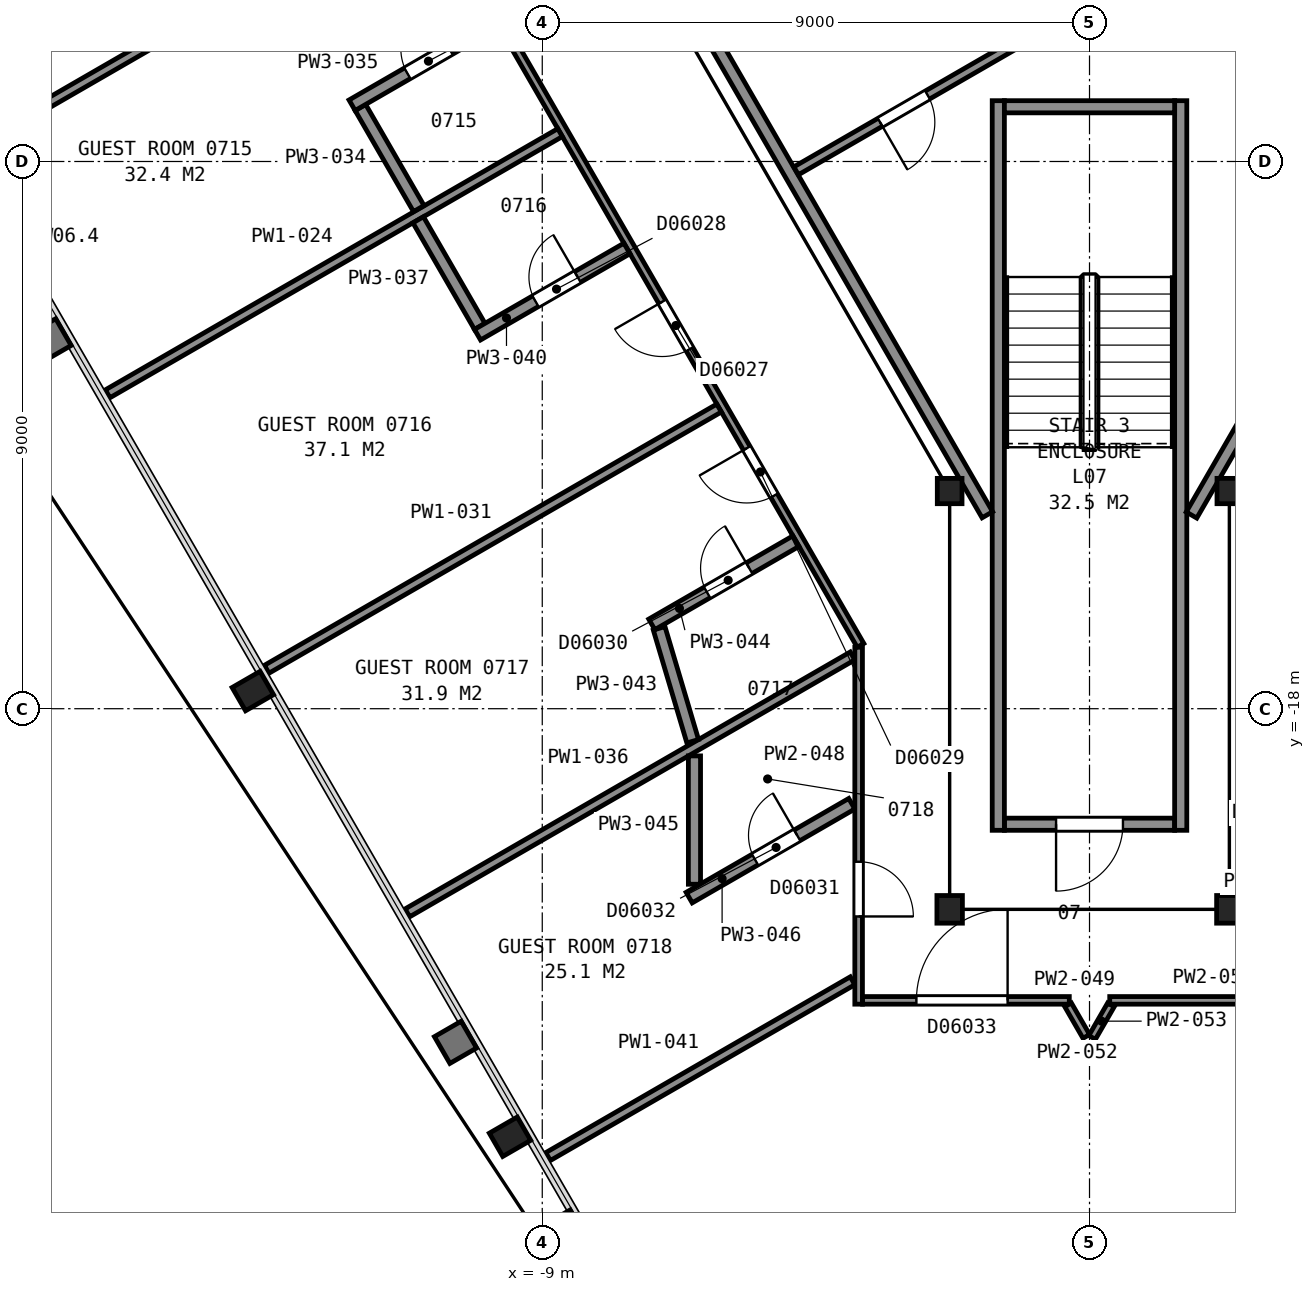
"""IFC4 building model, lengths in metres.
Left out: names, types, materials, properties, quantities, classifications, styles, units other than length and angle.
Written with IfcOpenShell. Run it as: python <this file> out.ifc"""

import sys

from ifc_helpers import new_model, si_unit, direction, frame, frame_2d, origin, origin_2d, place, context, subcontext, project, spatial, rectangle, i_section, extrude, element, fill, save


model = new_model("IFC4")
c1 = context("Model", 3, precision=1e-05, world=origin(), true_north=direction((0.0, 1.0)))
c2 = subcontext(c1, "Body", "Model", "MODEL_VIEW")
j1 = project(units=[si_unit("LENGTHUNIT", "METRE"), si_unit("PLANEANGLEUNIT", "RADIAN")], contexts=[c1])
p1 = place(None, origin())
s1 = spatial("IfcSite", under=j1, at=p1, CompositionType="ELEMENT")
p2 = place(p1, origin())
s2 = spatial("IfcBuilding", under=s1, at=p2, CompositionType="ELEMENT")
p3 = place(p2, frame((0.0, 0.0, 40.4)))
s3 = spatial("IfcBuildingStorey", under=s2, at=p3, CompositionType="ELEMENT", Elevation=40.4)
for number, where, z_axis, x_axis in (
    (1, (-13.76, -17.71, 0.0), (0.0, 0.0, 1.0), (-0.5, 0.866, 0.0)),
    (2, (-9.53, -25.04, 0.0), (0.0, 0.0, 1.0), (-0.5, 0.866, 0.0)),
):
    element("IfcColumn", number, at=place(p3, frame(where, z_axis=z_axis, x_axis=x_axis)), inside=s3, PredefinedType="COLUMN", context=c2, shape_type="SweptSolid", body=[
        extrude(i_section(OverallWidth=0.442, OverallDepth=0.531, WebThickness=0.066, FlangeThickness=0.106, FilletRadius=0.015, at=origin_2d()), origin(), (0.0, 0.0, 1.0), 3.575),
    ])
p4 = place(p3, frame((-2.3, -14.42, 0.0), z_axis=(0.0, 0.0, 1.0), x_axis=(1.0, 0.0, 0.0)))
e3 = element("IfcColumn", 3, at=p4, inside=s3, PredefinedType="COLUMN", context=c2, shape_type="SweptSolid", body=[
    extrude(i_section(OverallWidth=0.406, OverallDepth=0.417, WebThickness=0.03, FlangeThickness=0.048, FilletRadius=0.015, at=origin_2d()), origin(), (0.0, 0.0, 1.0), 3.6),
])
for number, where, z_axis, x_axis in (
    (4, (-2.3, -21.3, 0.0), (0.0, 0.0, 1.0), (-1.0, 0.0, 0.0)),
    (5, (2.3, -21.3, 0.0), (0.0, 0.0, 1.0), (-1.0, 0.0, 0.0)),
):
    element("IfcColumn", number, at=place(p3, frame(where, z_axis=z_axis, x_axis=x_axis)), inside=s3, PredefinedType="COLUMN", context=c2, shape_type="SweptSolid", body=[
        extrude(i_section(OverallWidth=0.419, OverallDepth=0.455, WebThickness=0.042, FlangeThickness=0.068, FilletRadius=0.015, at=origin_2d()), origin(), (0.0, 0.0, 1.0), 3.6),
    ])
p5 = place(p3, frame((2.3, -14.42, 0.0), z_axis=(0.0, 0.0, 1.0), x_axis=(1.0, 0.0, 0.0)))
e6 = element("IfcColumn", 6, at=p5, inside=s3, PredefinedType="COLUMN", context=c2, shape_type="SweptSolid", body=[
    extrude(i_section(OverallWidth=0.406, OverallDepth=0.417, WebThickness=0.03, FlangeThickness=0.048, FilletRadius=0.015, at=origin_2d()), origin(), (0.0, 0.0, 1.0), 3.6),
])
p6 = place(p3, frame((-1.4, -19.9, 0.0), z_axis=(0.0, 0.0, 1.0), x_axis=(1.0, 0.0, 0.0)))
e7 = element("IfcWall", 7, at=p6, inside=s3, PredefinedType="PARTITIONING", context=c2, shape_type="SweptSolid", body=[
    extrude(rectangle(XDim=2.8, YDim=0.2, at=frame_2d((1.4, 0.0))), origin(), (0.0, 0.0, 1.0), 3.35),
])
p7 = place(p6, frame((0.85, 0.0, 0.0)))
e8 = element("IfcOpeningElement", 8, at=p7, cuts=e7, PredefinedType="OPENING", context=c2, shape_type="SweptSolid", body=[
    extrude(rectangle(XDim=1.1, YDim=2.1, at=frame_2d((0.55, 1.05))), frame((0.0, 0.11, 0.0), z_axis=(0.0, -1.0, 0.0), x_axis=(1.0, 0.0, 0.0)), (0.0, 0.0, 1.0), 0.22),
])
for number, where, z_axis, x_axis in (
    (9, (1.5, -8.0, 0.0), (0.0, 0.0, 1.0), (0.0, -1.0, 0.0)),
    (10, (-1.5, -8.0, 0.0), (0.0, 0.0, 1.0), (0.0, -1.0, 0.0)),
):
    element("IfcWall", number, at=place(p3, frame(where, z_axis=z_axis, x_axis=x_axis)), inside=s3, PredefinedType="PARTITIONING", context=c2, shape_type="SweptSolid", body=[
        extrude(rectangle(XDim=12.0, YDim=0.2, at=frame_2d((6.0, 0.0))), origin(), (0.0, 0.0, 1.0), 3.35),
    ])
p8 = place(p3, frame((-1.4, -8.1, 0.0), z_axis=(0.0, 0.0, 1.0), x_axis=(1.0, 0.0, 0.0)))
e11 = element("IfcWall", 11, at=p8, inside=s3, PredefinedType="PARTITIONING", context=c2, shape_type="SweptSolid", body=[
    extrude(rectangle(XDim=2.8, YDim=0.2, at=frame_2d((1.4, 0.0))), origin(), (0.0, 0.0, 1.0), 3.35),
])
p9 = place(p3, frame((-13.664, 5.946, 0.0), z_axis=(0.0, 0.0, 1.0), x_axis=(0.499994327219, -0.866028678941, 0.0)))
e12 = element("IfcWall", 12, at=p9, inside=s3, PredefinedType="PARTITIONING", context=c2, shape_type="SweptSolid", body=[
    extrude(rectangle(XDim=23.968, YDim=0.2, at=frame_2d((11.984, 0.0))), origin(), (0.0, 0.0, 1.0), 3.35),
])
p10 = place(p3, frame((-4.825, -9.154, 0.0), z_axis=(0.0, 0.0, 1.0), x_axis=(0.866023738697, 0.500002884005, 0.0)))
e13 = element("IfcWall", 13, at=p10, inside=s3, PredefinedType="PARTITIONING", context=c2, shape_type="SweptSolid", body=[
    extrude(rectangle(XDim=4.22, YDim=0.15, at=frame_2d((2.11, 0.0))), origin(), (0.0, 0.0, 1.0), 3.35),
])
p11 = place(p10, frame((1.595, 0.0, 0.0)))
e14 = element("IfcOpeningElement", 14, at=p11, cuts=e13, PredefinedType="OPENING", context=c2, shape_type="SweptSolid", body=[
    extrude(rectangle(XDim=0.9, YDim=2.1, at=frame_2d((0.45, 1.05))), frame((0.0, 0.085, 0.0), z_axis=(0.0, -1.0, 0.0), x_axis=(1.0, 0.0, 0.0)), (0.0, 0.0, 1.0), 0.17),
])
p12 = place(p3, frame((1.677, -14.815, 0.0), z_axis=(0.0, 0.0, 1.0), x_axis=(0.49999445743, 0.866028603765, 0.0)))
e15 = element("IfcWall", 15, at=p12, inside=s3, PredefinedType="PARTITIONING", context=c2, shape_type="SweptSolid", body=[
    extrude(rectangle(XDim=5.905, YDim=0.2, at=frame_2d((2.952, 0.0))), origin(), (0.0, 0.0, 1.0), 3.35),
])
p13 = place(p12, frame((3.855, 0.0, 0.0)))
e16 = element("IfcOpeningElement", 16, at=p13, cuts=e15, PredefinedType="OPENING", context=c2, shape_type="SweptSolid", body=[
    extrude(rectangle(XDim=1.8, YDim=2.1, at=frame_2d((0.9, 1.05))), frame((0.0, 0.11, 0.0), z_axis=(0.0, -1.0, 0.0), x_axis=(1.0, 0.0, 0.0)), (0.0, 0.0, 1.0), 0.22),
])
p14 = place(p3, frame((-18.462, -8.813, 0.0), z_axis=(0.0, 0.0, 1.0), x_axis=(0.866029425019, 0.499993034952, 0.0)))
e17 = element("IfcWall", 17, at=p14, inside=s3, PredefinedType="PARTITIONING", context=c2, shape_type="SweptSolid", body=[
    extrude(rectangle(XDim=8.591, YDim=0.15, at=frame_2d((4.296, 0.0))), origin(), (0.0, 0.0, 1.0), 2.613),
])
p15 = place(p3, frame((-3.766, -16.958, 0.0), z_axis=(0.0, 0.0, 1.0), x_axis=(-0.500024758804, 0.866011108811, 0.0)))
e18 = element("IfcWall", 18, at=p15, inside=s3, PredefinedType="PARTITIONING", context=c2, shape_type="SweptSolid", body=[
    extrude(rectangle(XDim=26.402, YDim=0.125, at=frame_2d((13.201, 0.0))), origin(), (0.0, 0.0, 1.0), 2.613),
])
p16 = place(p15, frame((25.139, 0.0, 0.0)))
e19 = element("IfcOpeningElement", 19, at=p16, cuts=e18, PredefinedType="OPENING", context=c2, shape_type="SweptSolid", body=[
    extrude(rectangle(XDim=0.9, YDim=2.1, at=frame_2d((0.45, 1.05))), frame((0.0, 0.073, 0.0), z_axis=(0.0, -1.0, 0.0), x_axis=(1.0, 0.0, 0.0)), (0.0, 0.0, 1.0), 0.145),
])
p17 = place(p15, frame((22.963, 0.0, 0.0)))
e20 = element("IfcOpeningElement", 20, at=p17, cuts=e18, PredefinedType="OPENING", context=c2, shape_type="SweptSolid", body=[
    extrude(rectangle(XDim=1.0, YDim=2.1, at=frame_2d((0.5, 1.05))), frame((0.0, 0.073, 0.0), z_axis=(0.0, -1.0, 0.0), x_axis=(1.0, 0.0, 0.0)), (0.0, 0.0, 1.0), 0.145),
])
p18 = place(p15, frame((15.228, 0.0, 0.0)))
e21 = element("IfcOpeningElement", 21, at=p18, cuts=e18, PredefinedType="OPENING", context=c2, shape_type="SweptSolid", body=[
    extrude(rectangle(XDim=0.9, YDim=2.1, at=frame_2d((0.45, 1.05))), frame((0.0, 0.073, 0.0), z_axis=(0.0, -1.0, 0.0), x_axis=(1.0, 0.0, 0.0)), (0.0, 0.0, 1.0), 0.145),
])
p19 = place(p15, frame((12.702, 0.0, 0.0)))
e22 = element("IfcOpeningElement", 22, at=p19, cuts=e18, PredefinedType="OPENING", context=c2, shape_type="SweptSolid", body=[
    extrude(rectangle(XDim=0.9, YDim=2.1, at=frame_2d((0.45, 1.05))), frame((0.0, 0.073, 0.0), z_axis=(0.0, -1.0, 0.0), x_axis=(1.0, 0.0, 0.0)), (0.0, 0.0, 1.0), 0.145),
])
p20 = place(p15, frame((5.624, 0.0, 0.0)))
e23 = element("IfcOpeningElement", 23, at=p20, cuts=e18, PredefinedType="OPENING", context=c2, shape_type="SweptSolid", body=[
    extrude(rectangle(XDim=0.9, YDim=2.1, at=frame_2d((0.45, 1.05))), frame((0.0, 0.073, 0.0), z_axis=(0.0, -1.0, 0.0), x_axis=(1.0, 0.0, 0.0)), (0.0, 0.0, 1.0), 0.145),
])
p21 = place(p15, frame((2.843, 0.0, 0.0)))
e24 = element("IfcOpeningElement", 24, at=p21, cuts=e18, PredefinedType="OPENING", context=c2, shape_type="SweptSolid", body=[
    extrude(rectangle(XDim=0.9, YDim=2.1, at=frame_2d((0.45, 1.05))), frame((0.0, 0.073, 0.0), z_axis=(0.0, -1.0, 0.0), x_axis=(1.0, 0.0, 0.0)), (0.0, 0.0, 1.0), 0.145),
])
p22 = place(p3, frame((-16.148, -12.821, 0.0), z_axis=(0.0, 0.0, 1.0), x_axis=(0.866036528751, 0.499980730498, 0.0)))
e25 = element("IfcWall", 25, at=p22, inside=s3, PredefinedType="PARTITIONING", context=c2, shape_type="SweptSolid", body=[
    extrude(rectangle(XDim=8.592, YDim=0.15, at=frame_2d((4.296, 0.0))), origin(), (0.0, 0.0, 1.0), 2.613),
])
p23 = place(p3, frame((-13.532, -17.351, 0.0), z_axis=(0.0, 0.0, 1.0), x_axis=(0.866002910178, 0.500038958046, 0.0)))
e26 = element("IfcWall", 26, at=p23, inside=s3, PredefinedType="PARTITIONING", context=c2, shape_type="SweptSolid", body=[
    extrude(rectangle(XDim=8.591, YDim=0.15, at=frame_2d((4.295, 0.0))), origin(), (0.0, 0.0, 1.0), 2.613),
])
p24 = place(p3, frame((-11.991, -8.112, 0.0), z_axis=(0.0, 0.0, 1.0), x_axis=(0.499913221443, -0.866075499611, 0.0)))
e27 = element("IfcWall", 27, at=p24, inside=s3, PredefinedType="PARTITIONING", context=c2, shape_type="SweptSolid", body=[
    extrude(rectangle(XDim=1.92, YDim=0.2, at=frame_2d((0.96, 0.0))), origin(), (0.0, 0.0, 1.0), 2.613),
])
p25 = place(p3, frame((-9.761, -6.709, 0.0), z_axis=(0.0, 0.0, 1.0), x_axis=(-0.866012976267, -0.500021524473, 0.0)))
e28 = element("IfcWall", 28, at=p25, inside=s3, PredefinedType="PARTITIONING", context=c2, shape_type="SweptSolid", body=[
    extrude(rectangle(XDim=2.732, YDim=0.2, at=frame_2d((1.366, 0.0))), origin(), (0.0, 0.0, 1.0), 2.613),
])
p26 = place(p25, frame((0.882, 0.0, 0.0)))
e29 = element("IfcOpeningElement", 29, at=p26, cuts=e28, PredefinedType="OPENING", context=c2, shape_type="SweptSolid", body=[
    extrude(rectangle(XDim=0.8, YDim=2.1, at=frame_2d((0.4, 1.05))), frame((0.0, 0.11, 0.0), z_axis=(0.0, -1.0, 0.0), x_axis=(1.0, 0.0, 0.0)), (0.0, 0.0, 1.0), 0.22),
])
p27 = place(p3, frame((-11.219, -21.358, 0.0), z_axis=(0.0, 0.0, 1.0), x_axis=(0.866084603656, 0.499897448793, 0.0)))
e30 = element("IfcWall", 30, at=p27, inside=s3, PredefinedType="PARTITIONING", context=c2, shape_type="SweptSolid", body=[
    extrude(rectangle(XDim=8.454, YDim=0.15, at=frame_2d((4.227, 0.0))), origin(), (0.0, 0.0, 1.0), 2.613),
])
p28 = place(p3, frame((-11.041, -9.959, 0.0), z_axis=(0.0, 0.0, 1.0), x_axis=(0.500042536776, -0.866000843773, 0.0)))
e31 = element("IfcWall", 31, at=p28, inside=s3, PredefinedType="PARTITIONING", context=c2, shape_type="SweptSolid", body=[
    extrude(rectangle(XDim=2.025, YDim=0.2, at=frame_2d((1.012, 0.0))), origin(), (0.0, 0.0, 1.0), 2.613),
])
p29 = place(p3, frame((-10.065, -11.849, 0.0), z_axis=(0.0, 0.0, 1.0), x_axis=(0.866048046904, 0.499960778915, 0.0)))
e32 = element("IfcWall", 32, at=p29, inside=s3, PredefinedType="PARTITIONING", context=c2, shape_type="SweptSolid", body=[
    extrude(rectangle(XDim=2.838, YDim=0.2, at=frame_2d((1.419, 0.0))), origin(), (0.0, 0.0, 1.0), 2.613),
])
p30 = place(p29, frame((1.1, 0.0, 0.0)))
e33 = element("IfcOpeningElement", 33, at=p30, cuts=e32, PredefinedType="OPENING", context=c2, shape_type="SweptSolid", body=[
    extrude(rectangle(XDim=0.8, YDim=2.1, at=frame_2d((0.4, 1.05))), frame((0.0, 0.11, 0.0), z_axis=(0.0, -1.0, 0.0), x_axis=(1.0, 0.0, 0.0)), (0.0, 0.0, 1.0), 0.22),
])
p31 = place(p3, frame((-8.905, -25.366, 0.0), z_axis=(0.0, 0.0, 1.0), x_axis=(0.866025977343, 0.499999006567, 0.0)))
e34 = element("IfcWall", 34, at=p31, inside=s3, PredefinedType="PARTITIONING", context=c2, shape_type="SweptSolid", body=[
    extrude(rectangle(XDim=5.782, YDim=0.15, at=frame_2d((2.891, 0.0))), origin(), (0.0, 0.0, 1.0), 2.613),
])
p32 = place(p3, frame((-7.078, -16.678, 0.0), z_axis=(0.0, 0.0, 1.0), x_axis=(0.284907685531, -0.958554959679, 0.0)))
e35 = element("IfcWall", 35, at=p32, inside=s3, PredefinedType="PARTITIONING", context=c2, shape_type="SweptSolid", body=[
    extrude(rectangle(XDim=1.938, YDim=0.2, at=frame_2d((0.969, 0.0))), origin(), (0.0, 0.0, 1.0), 2.613),
])
p33 = place(p3, frame((-4.828, -15.244, 0.0), z_axis=(0.0, 0.0, 1.0), x_axis=(-0.86596722502, -0.50010075504, 0.0)))
e36 = element("IfcWall", 36, at=p33, inside=s3, PredefinedType="PARTITIONING", context=c2, shape_type="SweptSolid", body=[
    extrude(rectangle(XDim=2.737, YDim=0.2, at=frame_2d((1.369, 0.0))), origin(), (0.0, 0.0, 1.0), 2.613),
])
p34 = place(p33, frame((0.887, 0.0, 0.0)))
e37 = element("IfcOpeningElement", 37, at=p34, cuts=e36, PredefinedType="OPENING", context=c2, shape_type="SweptSolid", body=[
    extrude(rectangle(XDim=0.8, YDim=2.1, at=frame_2d((0.4, 1.05))), frame((0.0, 0.11, 0.0), z_axis=(0.0, -1.0, 0.0), x_axis=(1.0, 0.0, 0.0)), (0.0, 0.0, 1.0), 0.22),
])
p35 = place(p3, frame((-6.497, -20.887, 0.0), z_axis=(0.0, 0.0, 1.0), x_axis=(0.0, 1.0, 0.0)))
e38 = element("IfcWall", 38, at=p35, inside=s3, PredefinedType="PARTITIONING", context=c2, shape_type="SweptSolid", body=[
    extrude(rectangle(XDim=2.111, YDim=0.2, at=frame_2d((1.055, 0.0))), origin(), (0.0, 0.0, 1.0), 2.613),
])
p36 = place(p3, frame((-6.583, -21.107, 0.0), z_axis=(0.0, 0.0, 1.0), x_axis=(0.866015731669, 0.500016752221, 0.0)))
e39 = element("IfcWall", 39, at=p36, inside=s3, PredefinedType="PARTITIONING", context=c2, shape_type="SweptSolid", body=[
    extrude(rectangle(XDim=3.088, YDim=0.2, at=frame_2d((1.544, 0.0))), origin(), (0.0, 0.0, 1.0), 2.613),
])
p37 = place(p36, frame((1.25, 0.0, 0.0)))
e40 = element("IfcOpeningElement", 40, at=p37, cuts=e39, PredefinedType="OPENING", context=c2, shape_type="SweptSolid", body=[
    extrude(rectangle(XDim=0.8, YDim=2.1, at=frame_2d((0.4, 1.05))), frame((0.0, 0.11, 0.0), z_axis=(0.0, -1.0, 0.0), x_axis=(1.0, 0.0, 0.0)), (0.0, 0.0, 1.0), 0.22),
])
p38 = place(p3, frame((-3.797, -22.86, 0.0), z_axis=(0.0, 0.0, 1.0), x_axis=(0.0, 1.0, 0.0)))
e41 = element("IfcWall", 41, at=p38, inside=s3, PredefinedType="PARTITIONING", context=c2, shape_type="SweptSolid", body=[
    extrude(rectangle(XDim=5.871, YDim=0.125, at=frame_2d((2.935, 0.0))), origin(), (0.0, 0.0, 1.0), 2.613),
])
p39 = place(p38, frame((1.442, 0.0, 0.0)))
e42 = element("IfcOpeningElement", 42, at=p39, cuts=e41, PredefinedType="OPENING", context=c2, shape_type="SweptSolid", body=[
    extrude(rectangle(XDim=0.9, YDim=2.1, at=frame_2d((0.45, 1.05))), frame((0.0, 0.073, 0.0), z_axis=(0.0, -1.0, 0.0), x_axis=(1.0, 0.0, 0.0)), (0.0, 0.0, 1.0), 0.145),
])
p40 = place(p3, frame((-0.333, -22.797, 0.0), z_axis=(0.0, 0.0, 1.0), x_axis=(-1.0, 0.0, 0.0)))
e43 = element("IfcWall", 43, at=p40, inside=s3, PredefinedType="PARTITIONING", context=c2, shape_type="SweptSolid", body=[
    extrude(rectangle(XDim=3.399, YDim=0.125, at=frame_2d((1.7, 0.0))), origin(), (0.0, 0.0, 1.0), 2.613),
])
p41 = place(p40, frame((1.014, 0.0, 0.0)))
e44 = element("IfcOpeningElement", 44, at=p41, cuts=e43, PredefinedType="OPENING", context=c2, shape_type="SweptSolid", body=[
    extrude(rectangle(XDim=1.5, YDim=2.1, at=frame_2d((0.75, 1.05))), frame((0.0, 0.073, 0.0), z_axis=(0.0, -1.0, 0.0), x_axis=(1.0, 0.0, 0.0)), (0.0, 0.0, 1.0), 0.145),
])
p42 = place(p3, frame((-0.353, -22.871, 0.0), z_axis=(0.0, 0.0, 1.0), x_axis=(0.499863517517, -0.866104187645, 0.0)))
e45 = element("IfcWall", 45, at=p42, inside=s3, PredefinedType="PARTITIONING", context=c2, shape_type="SweptSolid", body=[
    extrude(rectangle(XDim=0.599, YDim=0.125, at=frame_2d((0.3, 0.0))), origin(), (0.0, 0.0, 1.0), 2.613),
])
p43 = place(p3, frame((0.043, -23.407, 0.0), z_axis=(0.0, 0.0, 1.0), x_axis=(0.499870333213, 0.866100253997, 0.0)))
e46 = element("IfcWall", 46, at=p43, inside=s3, PredefinedType="PARTITIONING", context=c2, shape_type="SweptSolid", body=[
    extrude(rectangle(XDim=0.619, YDim=0.125, at=frame_2d((0.31, 0.0))), origin(), (0.0, 0.0, 1.0), 2.613),
])
p44 = place(p3, frame((0.333, -22.797, 0.0), z_axis=(0.0, 0.0, 1.0), x_axis=(1.0, 0.0, 0.0)))
e47 = element("IfcWall", 47, at=p44, inside=s3, PredefinedType="PARTITIONING", context=c2, shape_type="SweptSolid", body=[
    extrude(rectangle(XDim=3.399, YDim=0.125, at=frame_2d((1.7, 0.0))), origin(), (0.0, 0.0, 1.0), 2.613),
])
p45 = place(p7, origin())
e48 = element("IfcDoor", 48, at=p45, inside=s3, OperationType="SINGLE_SWING_LEFT", PredefinedType="DOOR", context=c2, shape_type="SweptSolid", body=[
    extrude(rectangle(XDim=1.1, YDim=2.1, at=frame_2d((0.55, 1.05))), frame((0.0, 0.025, 0.0), z_axis=(0.0, -1.0, 0.0), x_axis=(1.0, 0.0, 0.0)), (0.0, 0.0, 1.0), 0.05),
])
fill(e8, e48)
p46 = place(p11, origin())
e49 = element("IfcDoor", 49, at=p46, inside=s3, OperationType="SINGLE_SWING_LEFT", PredefinedType="DOOR", context=c2, shape_type="SweptSolid", body=[
    extrude(rectangle(XDim=0.9, YDim=2.1, at=frame_2d((0.45, 1.05))), frame((0.0, 0.025, 0.0), z_axis=(0.0, -1.0, 0.0), x_axis=(1.0, 0.0, 0.0)), (0.0, 0.0, 1.0), 0.05),
])
fill(e14, e49)
p47 = place(p20, origin())
e50 = element("IfcDoor", 50, at=p47, inside=s3, OperationType="SINGLE_SWING_RIGHT", PredefinedType="DOOR", context=c2, shape_type="SweptSolid", body=[
    extrude(rectangle(XDim=0.9, YDim=2.1, at=frame_2d((0.45, 1.05))), frame((0.0, 0.025, 0.0), z_axis=(0.0, -1.0, 0.0), x_axis=(1.0, 0.0, 0.0)), (0.0, 0.0, 1.0), 0.05),
])
fill(e23, e50)
p48 = place(p21, origin())
e51 = element("IfcDoor", 51, at=p48, inside=s3, OperationType="SINGLE_SWING_RIGHT", PredefinedType="DOOR", context=c2, shape_type="SweptSolid", body=[
    extrude(rectangle(XDim=0.9, YDim=2.1, at=frame_2d((0.45, 1.05))), frame((0.0, 0.025, 0.0), z_axis=(0.0, -1.0, 0.0), x_axis=(1.0, 0.0, 0.0)), (0.0, 0.0, 1.0), 0.05),
])
fill(e24, e51)
p49 = place(p26, origin())
e52 = element("IfcDoor", 52, at=p49, inside=s3, OperationType="SINGLE_SWING_LEFT", PredefinedType="DOOR", context=c2, shape_type="SweptSolid", body=[
    extrude(rectangle(XDim=0.8, YDim=2.1, at=frame_2d((0.4, 1.05))), frame((0.0, 0.025, 0.0), z_axis=(0.0, -1.0, 0.0), x_axis=(1.0, 0.0, 0.0)), (0.0, 0.0, 1.0), 0.05),
])
fill(e29, e52)
p50 = place(p30, origin())
e53 = element("IfcDoor", 53, at=p50, inside=s3, OperationType="SINGLE_SWING_RIGHT", PredefinedType="DOOR", context=c2, shape_type="SweptSolid", body=[
    extrude(rectangle(XDim=0.8, YDim=2.1, at=frame_2d((0.4, 1.05))), frame((0.0, 0.025, 0.0), z_axis=(0.0, -1.0, 0.0), x_axis=(1.0, 0.0, 0.0)), (0.0, 0.0, 1.0), 0.05),
])
fill(e33, e53)
p51 = place(p34, origin())
e54 = element("IfcDoor", 54, at=p51, inside=s3, OperationType="SINGLE_SWING_LEFT", PredefinedType="DOOR", context=c2, shape_type="SweptSolid", body=[
    extrude(rectangle(XDim=0.8, YDim=2.1, at=frame_2d((0.4, 1.05))), frame((0.0, 0.025, 0.0), z_axis=(0.0, -1.0, 0.0), x_axis=(1.0, 0.0, 0.0)), (0.0, 0.0, 1.0), 0.05),
])
fill(e37, e54)
p52 = place(p37, origin())
e55 = element("IfcDoor", 55, at=p52, inside=s3, OperationType="SINGLE_SWING_RIGHT", PredefinedType="DOOR", context=c2, shape_type="SweptSolid", body=[
    extrude(rectangle(XDim=0.8, YDim=2.1, at=frame_2d((0.4, 1.05))), frame((0.0, 0.025, 0.0), z_axis=(0.0, -1.0, 0.0), x_axis=(1.0, 0.0, 0.0)), (0.0, 0.0, 1.0), 0.05),
])
fill(e40, e55)
p53 = place(p39, origin())
e56 = element("IfcDoor", 56, at=p53, inside=s3, OperationType="SINGLE_SWING_LEFT", PredefinedType="DOOR", context=c2, shape_type="SweptSolid", body=[
    extrude(rectangle(XDim=0.9, YDim=2.1, at=frame_2d((0.45, 1.05))), frame((0.0, 0.025, 0.0), z_axis=(0.0, -1.0, 0.0), x_axis=(1.0, 0.0, 0.0)), (0.0, 0.0, 1.0), 0.05),
])
fill(e42, e56)
p54 = place(p41, origin())
e57 = element("IfcDoor", 57, at=p54, inside=s3, OperationType="DOUBLE_DOOR_SINGLE_SWING", PredefinedType="DOOR", context=c2, shape_type="SweptSolid", body=[
    extrude(rectangle(XDim=1.5, YDim=2.1, at=frame_2d((0.75, 1.05))), frame((0.0, 0.025, 0.0), z_axis=(0.0, -1.0, 0.0), x_axis=(1.0, 0.0, 0.0)), (0.0, 0.0, 1.0), 0.05),
])
fill(e44, e57)
save(model, sys.argv[1])
